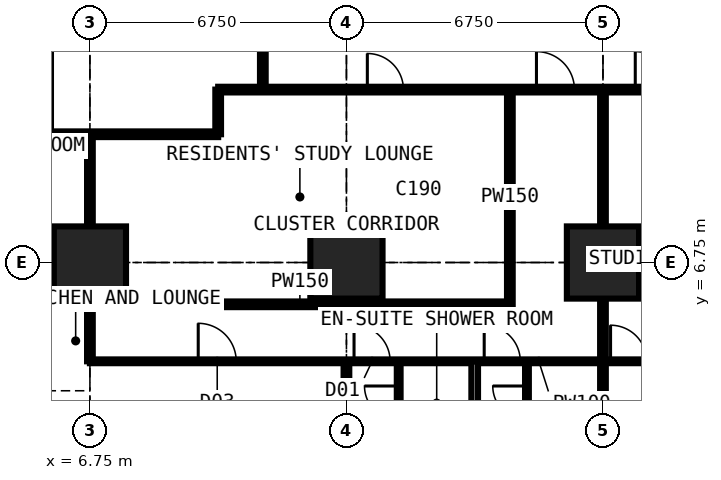
"""IFC4 building model, lengths in metres.
Left out: names, types, materials, properties, quantities, classifications, styles, units other than length and angle.
Written with IfcOpenShell. Run it as: python <this file> out.ifc"""

import sys

from ifc_helpers import new_model, si_unit, direction, frame, frame_2d, origin, origin_2d, place, context, subcontext, project, spatial, rectangle, extrude, element, fill, save


model = new_model("IFC4")
c1 = context("Model", 3, precision=1e-05, world=origin(), true_north=direction((0.0, 1.0)))
c2 = subcontext(c1, "Body", "Model", "MODEL_VIEW")
j1 = project(units=[si_unit("LENGTHUNIT", "METRE"), si_unit("PLANEANGLEUNIT", "RADIAN")], contexts=[c1])
p1 = place(None, origin())
s1 = spatial("IfcSite", under=j1, at=p1, CompositionType="ELEMENT")
p2 = place(p1, origin())
s2 = spatial("IfcBuilding", under=s1, at=p2, CompositionType="ELEMENT")
p3 = place(p2, frame((0.0, 0.0, 32.4)))
s3 = spatial("IfcBuildingStorey", under=s2, at=p3, CompositionType="ELEMENT", Elevation=32.4)
for number, where, z_axis, x_axis in (
    (1, (6.75, 6.75, 0.0), (0.0, 0.0, 1.0), (1.0, 0.0, 0.0)),
    (2, (13.5, 6.75, 0.0), (0.0, 0.0, 1.0), (1.0, 0.0, 0.0)),
    (3, (20.25, 6.75, 0.0), (0.0, 0.0, 1.0), (1.0, 0.0, 0.0)),
):
    element("IfcColumn", number, at=place(p3, frame(where, z_axis=z_axis, x_axis=x_axis)), inside=s3, PredefinedType="COLUMN", context=c2, shape_type="SweptSolid", body=[
        extrude(rectangle(XDim=1.9, YDim=1.9, at=origin_2d()), origin(), (0.0, 0.0, 1.0), 3.6),
    ])
p4 = place(p3, frame((-0.734, 10.125, 0.0), z_axis=(0.0, 0.0, 1.0), x_axis=(1.0, 0.0, 0.0)))
e4 = element("IfcWall", 4, at=p4, inside=s3, PredefinedType="PARTITIONING", context=c2, shape_type="SweptSolid", body=[
    extrude(rectangle(XDim=10.859, YDim=0.15, at=frame_2d((5.429, 0.0))), origin(), (0.0, 0.0, 1.0), 3.375),
])
p5 = place(p3, frame((6.75, 4.15, 0.0), z_axis=(0.0, 0.0, 1.0), x_axis=(0.0, 1.0, 0.0)))
e5 = element("IfcWall", 5, at=p5, inside=s3, PredefinedType="PARTITIONING", context=c2, shape_type="SweptSolid", body=[
    extrude(rectangle(XDim=5.975, YDim=0.15, at=frame_2d((2.988, 0.0))), origin(), (0.0, 0.0, 1.0), 2.877),
])
p6 = place(p3, frame((6.75, 4.15, 0.0), z_axis=(0.0, 0.0, 1.0), x_axis=(1.0, 0.0, 0.0)))
e6 = element("IfcWall", 6, at=p6, inside=s3, PredefinedType="PARTITIONING", context=c2, shape_type="SweptSolid", body=[
    extrude(rectangle(XDim=23.625, YDim=0.1, at=frame_2d((11.812, 0.0))), origin(), (0.0, 0.0, 1.0), 3.375),
])
p7 = place(p6, frame((2.85, 0.0, 0.0)))
e7 = element("IfcOpeningElement", 7, at=p7, cuts=e6, PredefinedType="OPENING", context=c2, shape_type="SweptSolid", body=[
    extrude(rectangle(XDim=1.0, YDim=2.2, at=frame_2d((0.5, 1.1))), frame((0.0, 0.06, 0.0), z_axis=(0.0, -1.0, 0.0), x_axis=(1.0, 0.0, 0.0)), (0.0, 0.0, 1.0), 0.12),
])
p8 = place(p6, frame((6.95, 0.0, 0.0)))
e8 = element("IfcOpeningElement", 8, at=p8, cuts=e6, PredefinedType="OPENING", context=c2, shape_type="SweptSolid", body=[
    extrude(rectangle(XDim=0.95, YDim=2.2, at=frame_2d((0.475, 1.1))), frame((0.0, 0.06, 0.0), z_axis=(0.0, -1.0, 0.0), x_axis=(1.0, 0.0, 0.0)), (0.0, 0.0, 1.0), 0.12),
])
p9 = place(p6, frame((10.375, 0.0, 0.0)))
e9 = element("IfcOpeningElement", 9, at=p9, cuts=e6, PredefinedType="OPENING", context=c2, shape_type="SweptSolid", body=[
    extrude(rectangle(XDim=0.95, YDim=2.2, at=frame_2d((0.475, 1.1))), frame((0.0, 0.06, 0.0), z_axis=(0.0, -1.0, 0.0), x_axis=(1.0, 0.0, 0.0)), (0.0, 0.0, 1.0), 0.12),
])
p10 = place(p6, frame((18.475, 0.0, 0.0)))
e10 = element("IfcOpeningElement", 10, at=p10, cuts=e6, PredefinedType="OPENING", context=c2, shape_type="SweptSolid", body=[
    extrude(rectangle(XDim=0.95, YDim=2.2, at=frame_2d((0.475, 1.1))), frame((0.0, 0.06, 0.0), z_axis=(0.0, -1.0, 0.0), x_axis=(1.0, 0.0, 0.0)), (0.0, 0.0, 1.0), 0.12),
])
p11 = place(p6, frame((13.7, 0.0, 0.0)))
e11 = element("IfcOpeningElement", 11, at=p11, cuts=e6, PredefinedType="OPENING", context=c2, shape_type="SweptSolid", body=[
    extrude(rectangle(XDim=0.95, YDim=2.2, at=frame_2d((0.475, 1.1))), frame((0.0, 0.06, 0.0), z_axis=(0.0, -1.0, 0.0), x_axis=(1.0, 0.0, 0.0)), (0.0, 0.0, 1.0), 0.12),
])
p12 = place(p3, frame((6.75, 5.65, 0.0), z_axis=(0.0, 0.0, 1.0), x_axis=(1.0, 0.0, 0.0)))
e12 = element("IfcWall", 12, at=p12, inside=s3, PredefinedType="PARTITIONING", context=c2, shape_type="SweptSolid", body=[
    extrude(rectangle(XDim=11.05, YDim=0.15, at=frame_2d((5.525, 0.0))), origin(), (0.0, 0.0, 1.0), 3.375),
])
p13 = place(p3, frame((10.125, 10.125, 0.0), z_axis=(0.0, 0.0, 1.0), x_axis=(0.0, 1.0, 0.0)))
e13 = element("IfcWall", 13, at=p13, inside=s3, PredefinedType="PARTITIONING", context=c2, shape_type="SweptSolid", body=[
    extrude(rectangle(XDim=1.175, YDim=0.15, at=frame_2d((0.587, 0.0))), origin(), (0.0, 0.0, 1.0), 3.375),
])
p14 = place(p3, frame((10.125, 11.3, 0.0), z_axis=(0.0, 0.0, 1.0), x_axis=(1.0, 0.0, 0.0)))
e14 = element("IfcWall", 14, at=p14, inside=s3, PredefinedType="PARTITIONING", context=c2, shape_type="SweptSolid", body=[
    extrude(rectangle(XDim=20.675, YDim=0.15, at=frame_2d((10.337, 0.0))), origin(), (0.0, 0.0, 1.0), 3.375),
])
p15 = place(p14, frame((8.375, 0.0, 0.0)))
e15 = element("IfcOpeningElement", 15, at=p15, cuts=e14, PredefinedType="OPENING", context=c2, shape_type="SweptSolid", body=[
    extrude(rectangle(XDim=1.0, YDim=2.2, at=frame_2d((0.5, 1.1))), frame((0.0, 0.085, 0.0), z_axis=(0.0, -1.0, 0.0), x_axis=(1.0, 0.0, 0.0)), (0.0, 0.0, 1.0), 0.17),
])
p16 = place(p14, frame((10.975, 0.0, 0.0)))
e16 = element("IfcOpeningElement", 16, at=p16, cuts=e14, PredefinedType="OPENING", context=c2, shape_type="SweptSolid", body=[
    extrude(rectangle(XDim=1.0, YDim=2.2, at=frame_2d((0.5, 1.1))), frame((0.0, 0.085, 0.0), z_axis=(0.0, -1.0, 0.0), x_axis=(1.0, 0.0, 0.0)), (0.0, 0.0, 1.0), 0.17),
])
p17 = place(p14, frame((3.925, 0.0, 0.0)))
e17 = element("IfcOpeningElement", 17, at=p17, cuts=e14, PredefinedType="OPENING", context=c2, shape_type="SweptSolid", body=[
    extrude(rectangle(XDim=0.95, YDim=2.2, at=frame_2d((0.475, 1.1))), frame((0.0, 0.085, 0.0), z_axis=(0.0, -1.0, 0.0), x_axis=(1.0, 0.0, 0.0)), (0.0, 0.0, 1.0), 0.17),
])
p18 = place(p3, frame((11.3, 11.3, 0.0), z_axis=(0.0, 0.0, 1.0), x_axis=(0.0, 1.0, 0.0)))
e18 = element("IfcWall", 18, at=p18, inside=s3, PredefinedType="PARTITIONING", context=c2, shape_type="SweptSolid", body=[
    extrude(rectangle(XDim=19.075, YDim=0.15, at=frame_2d((9.538, 0.0))), origin(), (0.0, 0.0, 1.0), 3.375),
])
p19 = place(p18, frame((12.875, 0.0, 0.0)))
e19 = element("IfcOpeningElement", 19, at=p19, cuts=e18, PredefinedType="OPENING", context=c2, shape_type="SweptSolid", body=[
    extrude(rectangle(XDim=1.0, YDim=2.2, at=frame_2d((0.5, 1.1))), frame((0.0, 0.085, 0.0), z_axis=(0.0, -1.0, 0.0), x_axis=(1.0, 0.0, 0.0)), (0.0, 0.0, 1.0), 0.17),
])
p20 = place(p18, frame((10.438, 0.0, 0.0)))
e20 = element("IfcOpeningElement", 20, at=p20, cuts=e18, PredefinedType="OPENING", context=c2, shape_type="SweptSolid", body=[
    extrude(rectangle(XDim=1.0, YDim=2.2, at=frame_2d((0.5, 1.1))), frame((0.0, 0.085, 0.0), z_axis=(0.0, -1.0, 0.0), x_axis=(1.0, 0.0, 0.0)), (0.0, 0.0, 1.0), 0.17),
])
p21 = place(p18, frame((15.675, 0.0, 0.0)))
e21 = element("IfcOpeningElement", 21, at=p21, cuts=e18, PredefinedType="OPENING", context=c2, shape_type="SweptSolid", body=[
    extrude(rectangle(XDim=0.95, YDim=2.2, at=frame_2d((0.475, 1.1))), frame((0.0, 0.085, 0.0), z_axis=(0.0, -1.0, 0.0), x_axis=(1.0, 0.0, 0.0)), (0.0, 0.0, 1.0), 0.17),
])
p22 = place(p3, frame((13.5, -0.734, 0.0), z_axis=(0.0, 0.0, 1.0), x_axis=(0.0, 1.0, 0.0)))
e22 = element("IfcWall", 22, at=p22, inside=s3, PredefinedType="PARTITIONING", context=c2, shape_type="SweptSolid", body=[
    extrude(rectangle(XDim=4.884, YDim=0.15, at=frame_2d((2.442, 0.0))), origin(), (0.0, 0.0, 1.0), 2.877),
])
p23 = place(p3, frame((14.875, 1.95, 0.0), z_axis=(0.0, 0.0, 1.0), x_axis=(0.0, 1.0, 0.0)))
e23 = element("IfcWall", 23, at=p23, inside=s3, PredefinedType="PARTITIONING", context=c2, shape_type="SweptSolid", body=[
    extrude(rectangle(XDim=2.2, YDim=0.1, at=frame_2d((1.1, 0.0))), origin(), (0.0, 0.0, 1.0), 3.375),
])
p24 = place(p23, frame((0.65, 0.0, 0.0)))
e24 = element("IfcOpeningElement", 24, at=p24, cuts=e23, PredefinedType="OPENING", context=c2, shape_type="SweptSolid", body=[
    extrude(rectangle(XDim=0.9, YDim=2.2, at=frame_2d((0.45, 1.1))), frame((0.0, 0.06, 0.0), z_axis=(0.0, -1.0, 0.0), x_axis=(1.0, 0.0, 0.0)), (0.0, 0.0, 1.0), 0.12),
])
p25 = place(p3, frame((16.875, -0.734, 0.0), z_axis=(0.0, 0.0, 1.0), x_axis=(0.0, 1.0, 0.0)))
e25 = element("IfcWall", 25, at=p25, inside=s3, PredefinedType="PARTITIONING", context=c2, shape_type="SweptSolid", body=[
    extrude(rectangle(XDim=4.884, YDim=0.175, at=frame_2d((2.442, 0.0))), origin(), (0.0, 0.0, 1.0), 3.375),
])
p26 = place(p3, frame((17.8, 5.65, 0.0), z_axis=(0.0, 0.0, 1.0), x_axis=(0.0, 1.0, 0.0)))
e26 = element("IfcWall", 26, at=p26, inside=s3, PredefinedType="PARTITIONING", context=c2, shape_type="SweptSolid", body=[
    extrude(rectangle(XDim=5.65, YDim=0.15, at=frame_2d((2.825, 0.0))), origin(), (0.0, 0.0, 1.0), 3.375),
])
p27 = place(p3, frame((18.25, 1.95, 0.0), z_axis=(0.0, 0.0, 1.0), x_axis=(0.0, 1.0, 0.0)))
e27 = element("IfcWall", 27, at=p27, inside=s3, PredefinedType="PARTITIONING", context=c2, shape_type="SweptSolid", body=[
    extrude(rectangle(XDim=2.2, YDim=0.1, at=frame_2d((1.1, 0.0))), origin(), (0.0, 0.0, 1.0), 3.375),
])
p28 = place(p27, frame((0.65, 0.0, 0.0)))
e28 = element("IfcOpeningElement", 28, at=p28, cuts=e27, PredefinedType="OPENING", context=c2, shape_type="SweptSolid", body=[
    extrude(rectangle(XDim=0.9, YDim=2.2, at=frame_2d((0.45, 1.1))), frame((0.0, 0.06, 0.0), z_axis=(0.0, -1.0, 0.0), x_axis=(1.0, 0.0, 0.0)), (0.0, 0.0, 1.0), 0.12),
])
p29 = place(p3, frame((20.25, -0.734, 0.0), z_axis=(0.0, 0.0, 1.0), x_axis=(0.0, 1.0, 0.0)))
e29 = element("IfcWall", 29, at=p29, inside=s3, PredefinedType="PARTITIONING", context=c2, shape_type="SweptSolid", body=[
    extrude(rectangle(XDim=12.034, YDim=0.15, at=frame_2d((6.017, 0.0))), origin(), (0.0, 0.0, 1.0), 2.61),
])
p30 = place(p7, origin())
e30 = element("IfcDoor", 30, at=p30, inside=s3, OperationType="SINGLE_SWING_LEFT", PredefinedType="DOOR", context=c2, shape_type="SweptSolid", body=[
    extrude(rectangle(XDim=1.0, YDim=2.2, at=frame_2d((0.5, 1.1))), frame((0.0, 0.025, 0.0), z_axis=(0.0, -1.0, 0.0), x_axis=(1.0, 0.0, 0.0)), (0.0, 0.0, 1.0), 0.05),
])
fill(e7, e30)
p31 = place(p8, origin())
e31 = element("IfcDoor", 31, at=p31, inside=s3, OperationType="SINGLE_SWING_LEFT", PredefinedType="DOOR", context=c2, shape_type="SweptSolid", body=[
    extrude(rectangle(XDim=0.95, YDim=2.2, at=frame_2d((0.475, 1.1))), frame((0.0, 0.025, 0.0), z_axis=(0.0, -1.0, 0.0), x_axis=(1.0, 0.0, 0.0)), (0.0, 0.0, 1.0), 0.05),
])
fill(e8, e31)
p32 = place(p24, origin())
e32 = element("IfcDoor", 32, at=p32, inside=s3, OperationType="SINGLE_SWING_RIGHT", PredefinedType="DOOR", context=c2, shape_type="SweptSolid", body=[
    extrude(rectangle(XDim=0.9, YDim=2.2, at=frame_2d((0.45, 1.1))), frame((0.0, 0.025, 0.0), z_axis=(0.0, -1.0, 0.0), x_axis=(1.0, 0.0, 0.0)), (0.0, 0.0, 1.0), 0.05),
])
fill(e24, e32)
p33 = place(p9, origin())
e33 = element("IfcDoor", 33, at=p33, inside=s3, OperationType="SINGLE_SWING_LEFT", PredefinedType="DOOR", context=c2, shape_type="SweptSolid", body=[
    extrude(rectangle(XDim=0.95, YDim=2.2, at=frame_2d((0.475, 1.1))), frame((0.0, 0.025, 0.0), z_axis=(0.0, -1.0, 0.0), x_axis=(1.0, 0.0, 0.0)), (0.0, 0.0, 1.0), 0.05),
])
fill(e9, e33)
p34 = place(p28, origin())
e34 = element("IfcDoor", 34, at=p34, inside=s3, OperationType="SINGLE_SWING_RIGHT", PredefinedType="DOOR", context=c2, shape_type="SweptSolid", body=[
    extrude(rectangle(XDim=0.9, YDim=2.2, at=frame_2d((0.45, 1.1))), frame((0.0, 0.025, 0.0), z_axis=(0.0, -1.0, 0.0), x_axis=(1.0, 0.0, 0.0)), (0.0, 0.0, 1.0), 0.05),
])
fill(e28, e34)
p35 = place(p15, origin())
e35 = element("IfcDoor", 35, at=p35, inside=s3, OperationType="SINGLE_SWING_LEFT", PredefinedType="DOOR", context=c2, shape_type="SweptSolid", body=[
    extrude(rectangle(XDim=1.0, YDim=2.2, at=frame_2d((0.5, 1.1))), frame((0.0, 0.025, 0.0), z_axis=(0.0, -1.0, 0.0), x_axis=(1.0, 0.0, 0.0)), (0.0, 0.0, 1.0), 0.05),
])
fill(e15, e35)
p36 = place(p11, origin())
e36 = element("IfcDoor", 36, at=p36, inside=s3, OperationType="SINGLE_SWING_LEFT", PredefinedType="DOOR", context=c2, shape_type="SweptSolid", body=[
    extrude(rectangle(XDim=0.95, YDim=2.2, at=frame_2d((0.475, 1.1))), frame((0.0, 0.025, 0.0), z_axis=(0.0, -1.0, 0.0), x_axis=(1.0, 0.0, 0.0)), (0.0, 0.0, 1.0), 0.05),
])
fill(e11, e36)
p37 = place(p16, origin())
e37 = element("IfcDoor", 37, at=p37, inside=s3, OperationType="SINGLE_SWING_LEFT", PredefinedType="DOOR", context=c2, shape_type="SweptSolid", body=[
    extrude(rectangle(XDim=1.0, YDim=2.2, at=frame_2d((0.5, 1.1))), frame((0.0, 0.025, 0.0), z_axis=(0.0, -1.0, 0.0), x_axis=(1.0, 0.0, 0.0)), (0.0, 0.0, 1.0), 0.05),
])
fill(e16, e37)
p38 = place(p17, origin())
e38 = element("IfcDoor", 38, at=p38, inside=s3, OperationType="SINGLE_SWING_LEFT", PredefinedType="DOOR", context=c2, shape_type="SweptSolid", body=[
    extrude(rectangle(XDim=0.95, YDim=2.2, at=frame_2d((0.475, 1.1))), frame((0.0, 0.025, 0.0), z_axis=(0.0, -1.0, 0.0), x_axis=(1.0, 0.0, 0.0)), (0.0, 0.0, 1.0), 0.05),
])
fill(e17, e38)
save(model, sys.argv[1])
